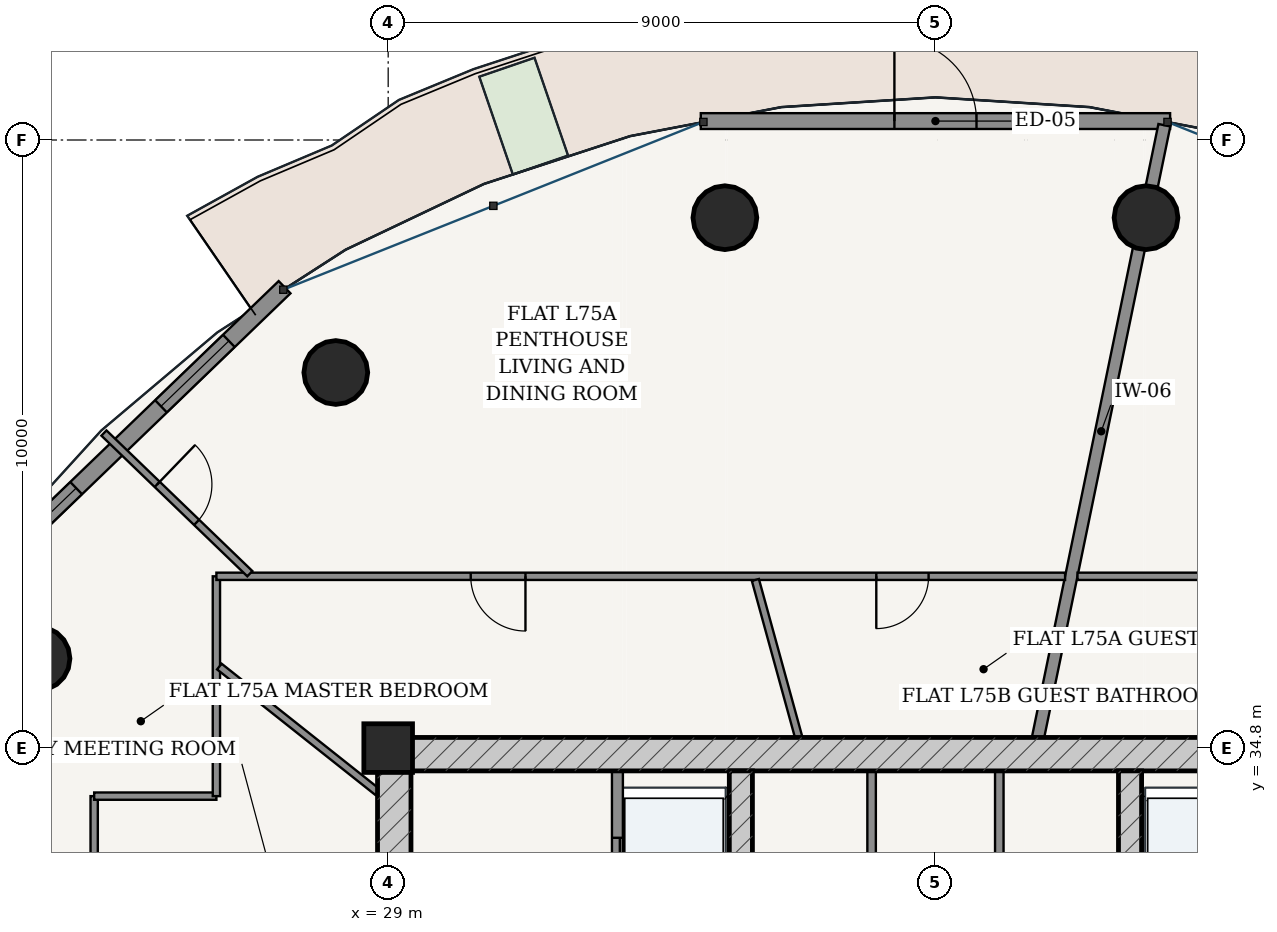
"""IFC4 building model, lengths in metres.
Left out: names, types, materials, properties, quantities, classifications, styles, units other than length and angle.
Written with IfcOpenShell. Run it as: python <this file> out.ifc"""

import sys

from ifc_helpers import new_model, si_unit, direction, frame, frame_2d, origin, origin_2d, place, context, subcontext, project, spatial, rectangle, hollow_circle, extrude, source, transform, mapped, element, fill, save


model = new_model("IFC4")
c1 = context("Model", 3, precision=1e-05, world=origin(), true_north=direction((-0.2419218956, 0.970295726276)))
c2 = subcontext(c1, "Body", "Model", "MODEL_VIEW")
j1 = project(units=[si_unit("LENGTHUNIT", "METRE"), si_unit("PLANEANGLEUNIT", "RADIAN")], contexts=[c1])
p1 = place(None, origin())
s1 = spatial("IfcSite", under=j1, at=p1, CompositionType="ELEMENT")
p2 = place(p1, origin())
s2 = spatial("IfcBuilding", under=s1, at=p2, CompositionType="ELEMENT")
p3 = place(p2, frame((0.0, 0.0, 285.7)))
s3 = spatial("IfcBuildingStorey", under=s2, at=p3, CompositionType="ELEMENT", Elevation=285.7)
p4 = place(p3, frame((29.0, 34.8, 0.0), z_axis=(0.0, 0.0, 1.0), x_axis=(1.0, 0.0, 0.0)))
e1 = element("IfcColumn", 1, at=p4, inside=s3, PredefinedType="COLUMN", context=c2, shape_type="SweptSolid", body=[
    extrude(rectangle(XDim=0.8, YDim=0.8, at=origin_2d()), origin(), (0.0, 0.0, 1.0), 3.75),
])
p5 = place(p3, frame((28.825, 34.7, 0.0), z_axis=(0.0, 0.0, 1.0), x_axis=(1.0, 0.0, 0.0)))
e2 = element("IfcWall", 2, at=p5, inside=s3, PredefinedType="SHEAR", context=c2, shape_type="SweptSolid", body=[
    extrude(rectangle(XDim=18.35, YDim=0.55, at=frame_2d((9.175, 0.0))), origin(), (0.0, 0.0, 1.0), 3.49),
])
p6 = place(p3, frame((29.1, 19.175, 0.0), z_axis=(0.0, 0.0, 1.0), x_axis=(0.0, 1.0, 0.0)))
e3 = element("IfcWall", 3, at=p6, inside=s3, PredefinedType="SHEAR", context=c2, shape_type="SweptSolid", body=[
    extrude(rectangle(XDim=15.25, YDim=0.55, at=frame_2d((7.625, 0.0))), origin(), (0.0, 0.0, 1.0), 3.49),
])
p7 = place(p6, frame((9.875, 0.0, 0.0)))
e4 = element("IfcOpeningElement", 4, at=p7, cuts=e3, PredefinedType="OPENING", context=c2, shape_type="SweptSolid", body=[
    extrude(rectangle(XDim=1.5, YDim=2.2, at=frame_2d((0.75, 1.1))), frame((0.0, 0.285, 0.0), z_axis=(0.0, -1.0, 0.0), x_axis=(1.0, 0.0, 0.0)), (0.0, 0.0, 1.0), 0.57),
])
p8 = place(p3, frame((34.8, 19.175, 0.0), z_axis=(0.0, 0.0, 1.0), x_axis=(0.0, 1.0, 0.0)))
e5 = element("IfcWall", 5, at=p8, inside=s3, PredefinedType="SHEAR", context=c2, shape_type="SweptSolid", body=[
    extrude(rectangle(XDim=15.25, YDim=0.38, at=frame_2d((7.625, 0.0))), origin(), (0.0, 0.0, 1.0), 3.49),
])
p9 = place(p8, frame((7.8, 0.0, 0.0)))
e6 = element("IfcOpeningElement", 6, at=p9, cuts=e5, PredefinedType="OPENING", context=c2, shape_type="SweptSolid", body=[
    extrude(rectangle(XDim=1.05, YDim=2.15, at=frame_2d((0.525, 1.075))), frame((0.0, 0.2, 0.0), z_axis=(0.0, -1.0, 0.0), x_axis=(1.0, 0.0, 0.0)), (0.0, 0.0, 1.0), 0.4),
])
p10 = place(p3, frame((41.2, 19.175, 0.0), z_axis=(0.0, 0.0, 1.0), x_axis=(0.0, 1.0, 0.0)))
e7 = element("IfcWall", 7, at=p10, inside=s3, PredefinedType="SHEAR", context=c2, shape_type="SweptSolid", body=[
    extrude(rectangle(XDim=15.25, YDim=0.38, at=frame_2d((7.625, 0.0))), origin(), (0.0, 0.0, 1.0), 3.49),
])
p11 = place(p10, frame((7.8, 0.0, 0.0)))
e8 = element("IfcOpeningElement", 8, at=p11, cuts=e7, PredefinedType="OPENING", context=c2, shape_type="SweptSolid", body=[
    extrude(rectangle(XDim=1.05, YDim=2.15, at=frame_2d((0.525, 1.075))), frame((0.0, 0.2, 0.0), z_axis=(0.0, -1.0, 0.0), x_axis=(1.0, 0.0, 0.0)), (0.0, 0.0, 1.0), 0.4),
])
for number, where, z_axis, x_axis in (
    (9, (41.463, 43.522, 0.0), (0.0, 0.0, 1.0), (1.0, 0.0, 0.0)),
    (10, (34.537, 43.522, 0.0), (0.0, 0.0, 1.0), (1.0, 0.0, 0.0)),
    (11, (28.139, 40.977, 0.0), (0.0, 0.0, 1.0), (1.0, 0.0, 0.0)),
    (12, (23.241, 36.272, 0.0), (0.0, 0.0, 1.0), (1.0, 0.0, 0.0)),
):
    element("IfcColumn", number, at=place(p3, frame(where, z_axis=z_axis, x_axis=x_axis)), inside=s3, PredefinedType="COLUMN", context=c2, shape_type="SweptSolid", body=[
        extrude(hollow_circle(Radius=0.525, WallThickness=0.035, at=origin_2d()), origin(), (0.0, 0.0, 1.0), 3.75),
    ])
p12 = place(p3, frame((41.859, 45.111, 0.0), z_axis=(0.0, 0.0, 1.0), x_axis=(-1.0, 0.0, 0.0)))
e13 = element("IfcWall", 13, at=p12, inside=s3, PredefinedType="SOLIDWALL", context=c2, shape_type="SweptSolid", body=[
    extrude(rectangle(XDim=7.718, YDim=0.26, at=frame_2d((3.859, 0.0))), origin(), (0.0, 0.0, 1.0), 3.49),
])
p13 = place(p12, frame((3.184, 0.0, 0.0)))
e14 = element("IfcOpeningElement", 14, at=p13, cuts=e13, PredefinedType="OPENING", context=c2, shape_type="SweptSolid", body=[
    extrude(rectangle(XDim=1.35, YDim=2.2, at=frame_2d((0.675, 1.1))), frame((0.0, 0.14, 0.0), z_axis=(0.0, -1.0, 0.0), x_axis=(1.0, 0.0, 0.0)), (0.0, 0.0, 1.0), 0.28),
])
p14 = place(p3, frame((27.296, 42.379, 0.0), z_axis=(0.0, 0.0, 1.0), x_axis=(-0.719979309073, -0.693995529169, 0.0)))
e15 = element("IfcWall", 15, at=p14, inside=s3, PredefinedType="SOLIDWALL", context=c2, shape_type="SweptSolid", body=[
    extrude(rectangle(XDim=7.583, YDim=0.28, at=frame_2d((3.791, 0.0))), origin(), (0.0, 0.0, 1.0), 3.49),
])
p15 = place(p14, frame((1.272, 0.0, 0.85)))
e16 = element("IfcOpeningElement", 16, at=p15, cuts=e15, PredefinedType="OPENING", context=c2, shape_type="SweptSolid", body=[
    extrude(rectangle(XDim=1.55, YDim=1.95, at=frame_2d((0.775, 0.975))), frame((0.0, 0.15, 0.0), z_axis=(0.0, -1.0, 0.0), x_axis=(1.0, 0.0, 0.0)), (0.0, 0.0, 1.0), 0.3),
])
p16 = place(p14, frame((4.76, 0.0, 0.85)))
e17 = element("IfcOpeningElement", 17, at=p16, cuts=e15, PredefinedType="OPENING", context=c2, shape_type="SweptSolid", body=[
    extrude(rectangle(XDim=1.55, YDim=1.95, at=frame_2d((0.775, 0.975))), frame((0.0, 0.15, 0.0), z_axis=(0.0, -1.0, 0.0), x_axis=(1.0, 0.0, 0.0)), (0.0, 0.0, 1.0), 0.3),
])
p17 = place(p3, frame((32.77, 28.52, 0.0), z_axis=(0.0, 0.0, 1.0), x_axis=(0.0, 1.0, 0.0)))
e18 = element("IfcWall", 18, at=p17, inside=s3, PredefinedType="PARTITIONING", context=c2, shape_type="SweptSolid", body=[
    extrude(rectangle(XDim=5.905, YDim=0.18, at=frame_2d((2.953, 0.0))), origin(), (0.0, 0.0, 1.0), 3.49),
])
p18 = place(p17, frame((3.655, 0.0, 0.0)))
e19 = element("IfcOpeningElement", 19, at=p18, cuts=e18, PredefinedType="OPENING", context=c2, shape_type="SweptSolid", body=[
    extrude(rectangle(XDim=1.15, YDim=2.2, at=frame_2d((0.575, 1.1))), frame((0.0, 0.1, 0.0), z_axis=(0.0, -1.0, 0.0), x_axis=(1.0, 0.0, 0.0)), (0.0, 0.0, 1.0), 0.2),
])
p19 = place(p17, frame((0.73, 0.0, 0.0)))
e20 = element("IfcOpeningElement", 20, at=p19, cuts=e18, PredefinedType="OPENING", context=c2, shape_type="SweptSolid", body=[
    extrude(rectangle(XDim=1.2, YDim=2.25, at=frame_2d((0.6, 1.125))), frame((0.0, 0.1, 0.0), z_axis=(0.0, -1.0, 0.0), x_axis=(1.0, 0.0, 0.0)), (0.0, 0.0, 1.0), 0.2),
])
for number, where, z_axis, x_axis in (
    (21, (36.95, 28.56, 0.0), (0.0, 0.0, 1.0), (0.0, 1.0, 0.0)),
    (22, (39.05, 28.56, 0.0), (0.0, 0.0, 1.0), (0.0, 1.0, 0.0)),
):
    element("IfcWall", number, at=place(p3, frame(where, z_axis=z_axis, x_axis=x_axis)), inside=s3, PredefinedType="PARTITIONING", context=c2, shape_type="SweptSolid", body=[
        extrude(rectangle(XDim=5.865, YDim=0.14, at=frame_2d((2.933, 0.0))), origin(), (0.0, 0.0, 1.0), 3.49),
    ])
p20 = place(p3, frame((39.688, 34.977, 0.0), z_axis=(0.0, 0.0, 1.0), x_axis=(0.202091890364, 0.979366564596, 0.0)))
e23 = element("IfcWall", 23, at=p20, inside=s3, PredefinedType="PARTITIONING", context=c2, shape_type="SweptSolid", body=[
    extrude(rectangle(XDim=10.278, YDim=0.2, at=frame_2d((5.139, 0.0))), origin(), (0.0, 0.0, 1.0), 2.575),
])
p21 = place(p3, frame((24.165, 14.465, 0.0), z_axis=(0.0, 0.0, 1.0), x_axis=(0.0, 1.0, 0.0)))
e24 = element("IfcWall", 24, at=p21, inside=s3, PredefinedType="PARTITIONING", context=c2, shape_type="SweptSolid", body=[
    extrude(rectangle(XDim=19.545, YDim=0.12, at=frame_2d((9.772, 0.0))), origin(), (0.0, 0.0, 1.0), 3.015),
])
p22 = place(p21, frame((4.875, 0.0, 0.0)))
e25 = element("IfcOpeningElement", 25, at=p22, cuts=e24, PredefinedType="OPENING", context=c2, shape_type="SweptSolid", body=[
    extrude(rectangle(XDim=0.9, YDim=2.15, at=frame_2d((0.45, 1.075))), frame((0.0, 0.07, 0.0), z_axis=(0.0, -1.0, 0.0), x_axis=(1.0, 0.0, 0.0)), (0.0, 0.0, 1.0), 0.14),
])
p23 = place(p21, frame((16.61, 0.0, 0.0)))
e26 = element("IfcOpeningElement", 26, at=p23, cuts=e24, PredefinedType="OPENING", context=c2, shape_type="SweptSolid", body=[
    extrude(rectangle(XDim=0.9, YDim=2.15, at=frame_2d((0.45, 1.075))), frame((0.0, 0.07, 0.0), z_axis=(0.0, -1.0, 0.0), x_axis=(1.0, 0.0, 0.0)), (0.0, 0.0, 1.0), 0.14),
])
p24 = place(p3, frame((24.165, 34.01, 0.0), z_axis=(0.0, 0.0, 1.0), x_axis=(1.0, 0.0, 0.0)))
e27 = element("IfcWall", 27, at=p24, inside=s3, PredefinedType="PARTITIONING", context=c2, shape_type="SweptSolid", body=[
    extrude(rectangle(XDim=2.01, YDim=0.12, at=frame_2d((1.005, 0.0))), origin(), (0.0, 0.0, 1.0), 3.209),
])
p25 = place(p3, frame((26.175, 34.01, 0.0), z_axis=(0.0, 0.0, 1.0), x_axis=(0.0, 1.0, 0.0)))
e28 = element("IfcWall", 28, at=p25, inside=s3, PredefinedType="PARTITIONING", context=c2, shape_type="SweptSolid", body=[
    extrude(rectangle(XDim=3.615, YDim=0.12, at=frame_2d((1.808, 0.0))), origin(), (0.0, 0.0, 1.0), 3.015),
])
p26 = place(p3, frame((26.175, 37.625, 0.0), z_axis=(0.0, 0.0, 1.0), x_axis=(1.0, 0.0, 0.0)))
e29 = element("IfcWall", 29, at=p26, inside=s3, PredefinedType="PARTITIONING", context=c2, shape_type="SweptSolid", body=[
    extrude(rectangle(XDim=13.957, YDim=0.12, at=frame_2d((6.979, 0.0))), origin(), (0.0, 0.0, 1.0), 3.015),
])
p27 = place(p26, frame((10.852, 0.0, 0.0)))
e30 = element("IfcOpeningElement", 30, at=p27, cuts=e29, PredefinedType="OPENING", context=c2, shape_type="SweptSolid", body=[
    extrude(rectangle(XDim=0.86, YDim=2.15, at=frame_2d((0.43, 1.075))), frame((0.0, 0.07, 0.0), z_axis=(0.0, -1.0, 0.0), x_axis=(1.0, 0.0, 0.0)), (0.0, 0.0, 1.0), 0.14),
])
p28 = place(p26, frame((4.183, 0.0, 0.0)))
e31 = element("IfcOpeningElement", 31, at=p28, cuts=e29, PredefinedType="OPENING", context=c2, shape_type="SweptSolid", body=[
    extrude(rectangle(XDim=0.9, YDim=2.15, at=frame_2d((0.45, 1.075))), frame((0.0, 0.07, 0.0), z_axis=(0.0, -1.0, 0.0), x_axis=(1.0, 0.0, 0.0)), (0.0, 0.0, 1.0), 0.14),
])
p29 = place(p3, frame((26.725, 37.668, 0.0), z_axis=(0.0, 0.0, 1.0), x_axis=(-0.719954096891, 0.694021684366, 0.0)))
e32 = element("IfcWall", 32, at=p29, inside=s3, PredefinedType="PARTITIONING", context=c2, shape_type="SweptSolid", body=[
    extrude(rectangle(XDim=3.333, YDim=0.12, at=frame_2d((1.667, 0.0))), origin(), (0.0, 0.0, 1.0), 3.121),
])
p30 = place(p29, frame((1.216, 0.0, 0.0)))
e33 = element("IfcOpeningElement", 33, at=p30, cuts=e32, PredefinedType="OPENING", context=c2, shape_type="SweptSolid", body=[
    extrude(rectangle(XDim=0.9, YDim=2.15, at=frame_2d((0.45, 1.075))), frame((0.0, 0.07, 0.0), z_axis=(0.0, -1.0, 0.0), x_axis=(1.0, 0.0, 0.0)), (0.0, 0.0, 1.0), 0.14),
])
p31 = place(p3, frame((24.107, 32.347, 0.0), z_axis=(0.0, 0.0, 1.0), x_axis=(-0.928712556691, 0.370800467966, 0.0)))
e34 = element("IfcWall", 34, at=p31, inside=s3, PredefinedType="PARTITIONING", context=c2, shape_type="SweptSolid", body=[
    extrude(rectangle(XDim=4.28, YDim=0.12, at=frame_2d((2.14, 0.0))), origin(), (0.0, 0.0, 1.0), 3.121),
])
p32 = place(p31, frame((1.69, 0.0, 0.0)))
e35 = element("IfcOpeningElement", 35, at=p32, cuts=e34, PredefinedType="OPENING", context=c2, shape_type="SweptSolid", body=[
    extrude(rectangle(XDim=0.9, YDim=2.15, at=frame_2d((0.45, 1.075))), frame((0.0, 0.07, 0.0), z_axis=(0.0, -1.0, 0.0), x_axis=(1.0, 0.0, 0.0)), (0.0, 0.0, 1.0), 0.14),
])
p33 = place(p3, frame((35.751, 34.977, 0.0), z_axis=(0.0, 0.0, 1.0), x_axis=(-0.26521778697, 0.964188532122, 0.0)))
e36 = element("IfcWall", 36, at=p33, inside=s3, PredefinedType="PARTITIONING", context=c2, shape_type="SweptSolid", body=[
    extrude(rectangle(XDim=2.684, YDim=0.12, at=frame_2d((1.342, 0.0))), origin(), (0.0, 0.0, 1.0), 2.575),
])
p34 = place(p3, frame((28.825, 34.077, 0.0), z_axis=(0.0, 0.0, 1.0), x_axis=(-0.783444596274, 0.621461635637, 0.0)))
e37 = element("IfcWall", 37, at=p34, inside=s3, PredefinedType="PARTITIONING", context=c2, shape_type="SweptSolid", body=[
    extrude(rectangle(XDim=3.32, YDim=0.12, at=frame_2d((1.66, 0.0))), origin(), (0.0, 0.0, 1.0), 3.209),
])
p35 = place(p3, frame((40.336, 37.625, 0.0), z_axis=(0.0, 0.0, 1.0), x_axis=(1.0, 0.0, 0.0)))
e38 = element("IfcWall", 38, at=p35, inside=s3, PredefinedType="PARTITIONING", context=c2, shape_type="SweptSolid", body=[
    extrude(rectangle(XDim=9.489, YDim=0.12, at=frame_2d((4.745, 0.0))), origin(), (0.0, 0.0, 1.0), 3.015),
])
m1 = source(origin(), c2, "Body", "SweptSolid", [
    extrude(rectangle(XDim=1.35, YDim=2.2, at=frame_2d((0.675, 1.1))), frame((0.0, 0.025, 0.0), z_axis=(0.0, -1.0, 0.0), x_axis=(1.0, 0.0, 0.0)), (0.0, 0.0, 1.0), 0.05),
])
p36 = place(p13, frame((1.35, 0.0, 0.0), z_axis=(0.0, 0.0, 1.0), x_axis=(-1.0, 0.0, 0.0)))
e39 = element("IfcDoor", 39, at=p36, inside=s3, OperationType="SINGLE_SWING_LEFT", PredefinedType="DOOR", context=c2, shape_type="MappedRepresentation", body=[
    mapped(m1, transform((0.0, 0.0, 0.0), scale=1.0)),
])
fill(e14, e39)
m2 = source(origin(), c2, "Body", "SweptSolid", [
    extrude(rectangle(XDim=1.55, YDim=1.95, at=frame_2d((0.775, 0.975))), frame((0.0, 0.03, 0.0), z_axis=(0.0, -1.0, 0.0), x_axis=(1.0, 0.0, 0.0)), (0.0, 0.0, 1.0), 0.06),
])
p37 = place(p15, origin())
e40 = element("IfcWindow", 40, at=p37, inside=s3, PartitioningType="SINGLE_PANEL", PredefinedType="WINDOW", context=c2, shape_type="MappedRepresentation", body=[
    mapped(m2, transform((0.0, 0.0, 0.0), scale=1.0)),
])
fill(e16, e40)
p38 = place(p16, origin())
e41 = element("IfcWindow", 41, at=p38, inside=s3, PartitioningType="SINGLE_PANEL", PredefinedType="WINDOW", context=c2, shape_type="MappedRepresentation", body=[
    mapped(m2, transform((0.0, 0.0, 0.0), scale=1.0)),
])
fill(e17, e41)
m3 = source(origin(), c2, "Body", "SweptSolid", [
    extrude(rectangle(XDim=1.15, YDim=2.2, at=frame_2d((0.575, 1.1))), frame((0.0, 0.025, 0.0), z_axis=(0.0, -1.0, 0.0), x_axis=(1.0, 0.0, 0.0)), (0.0, 0.0, 1.0), 0.05),
])
p39 = place(p18, origin())
e42 = element("IfcDoor", 42, at=p39, inside=s3, OperationType="DOUBLE_DOOR_SLIDING", PredefinedType="DOOR", context=c2, shape_type="MappedRepresentation", body=[
    mapped(m3, transform((0.0, 0.0, 0.0), scale=1.0)),
])
fill(e19, e42)
m4 = source(origin(), c2, "Body", "SweptSolid", [
    extrude(rectangle(XDim=0.9, YDim=2.15, at=frame_2d((0.45, 1.075))), frame((0.0, 0.025, 0.0), z_axis=(0.0, -1.0, 0.0), x_axis=(1.0, 0.0, 0.0)), (0.0, 0.0, 1.0), 0.05),
])
p40 = place(p30, frame((0.9, 0.0, 0.0), z_axis=(0.0, 0.0, 1.0), x_axis=(-1.0, 0.0, 0.0)))
e43 = element("IfcDoor", 43, at=p40, inside=s3, OperationType="SINGLE_SWING_LEFT", PredefinedType="DOOR", context=c2, shape_type="MappedRepresentation", body=[
    mapped(m4, transform((0.0, 0.0, 0.0), scale=1.0)),
])
fill(e33, e43)
m5 = source(origin(), c2, "Body", "SweptSolid", [
    extrude(rectangle(XDim=0.86, YDim=2.15, at=frame_2d((0.43, 1.075))), frame((0.0, 0.025, 0.0), z_axis=(0.0, -1.0, 0.0), x_axis=(1.0, 0.0, 0.0)), (0.0, 0.0, 1.0), 0.05),
])
p41 = place(p27, frame((0.86, 0.0, 0.0), z_axis=(0.0, 0.0, 1.0), x_axis=(-1.0, 0.0, 0.0)))
e44 = element("IfcDoor", 44, at=p41, inside=s3, OperationType="SINGLE_SWING_RIGHT", PredefinedType="DOOR", context=c2, shape_type="MappedRepresentation", body=[
    mapped(m5, transform((0.0, 0.0, 0.0), scale=1.0)),
])
fill(e30, e44)
p42 = place(p28, frame((0.9, 0.0, 0.0), z_axis=(0.0, 0.0, 1.0), x_axis=(-1.0, 0.0, 0.0)))
e45 = element("IfcDoor", 45, at=p42, inside=s3, OperationType="SINGLE_SWING_LEFT", PredefinedType="DOOR", context=c2, shape_type="MappedRepresentation", body=[
    mapped(m4, transform((0.0, 0.0, 0.0), scale=1.0)),
])
fill(e31, e45)
save(model, sys.argv[1])
